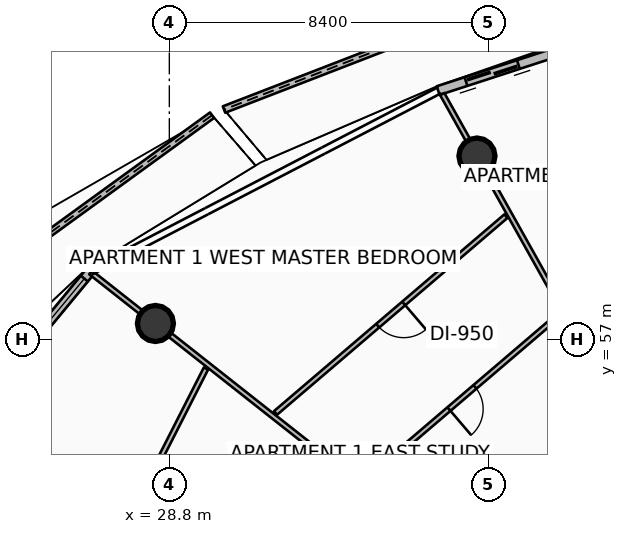
"""IFC4 building model, lengths in metres.
Left out: names, types, materials, properties, quantities, classifications, styles, units other than length and angle.
Written with IfcOpenShell. Run it as: python <this file> out.ifc"""

import sys

from ifc_helpers import new_model, si_unit, direction, frame, frame_2d, origin, origin_2d, place, context, subcontext, project, spatial, polyline, rectangle, circle, outline, extrude, element, fill, save


model = new_model("IFC4")
c1 = context("Model", 3, precision=1e-05, world=origin(), true_north=direction((0.0, 1.0)))
c2 = subcontext(c1, "Body", "Model", "MODEL_VIEW")
j1 = project(units=[si_unit("LENGTHUNIT", "METRE"), si_unit("PLANEANGLEUNIT", "RADIAN")], contexts=[c1])
p1 = place(None, origin())
s1 = spatial("IfcSite", under=j1, at=p1, CompositionType="ELEMENT")
p2 = place(p1, origin())
s2 = spatial("IfcBuilding", under=s1, at=p2, CompositionType="ELEMENT")
p3 = place(p2, frame((0.0, 0.0, 259.8)))
s3 = spatial("IfcBuildingStorey", under=s2, at=p3, CompositionType="ELEMENT", Elevation=259.8)
for number, where, z_axis, x_axis in (
    (1, (36.895, 61.83, 0.0), (0.0, 0.0, 1.0), (1.0, 0.0, 0.0)),
    (2, (28.434, 57.425, 0.0), (0.0, 0.0, 1.0), (1.0, 0.0, 0.0)),
):
    element("IfcColumn", number, at=place(p3, frame(where, z_axis=z_axis, x_axis=x_axis)), inside=s3, PredefinedType="COLUMN", context=c2, shape_type="SweptSolid", body=[
        extrude(circle(Radius=0.475, at=origin_2d()), origin(), (0.0, 0.0, 1.0), 3.59),
    ])
p4 = place(p3, frame((39.828, 66.762, 0.0), z_axis=(0.0, 0.0, 1.0), x_axis=(-0.9326848715, -0.36069229334, 0.0)))
e3 = element("IfcWall", 3, at=p4, inside=s3, PredefinedType="PARAPET", context=c2, shape_type="SweptSolid", body=[
    extrude(outline(polyline([(0.0, 0.0), (10.281, 0.0), (10.281, 1.224), (5.14, 1.127), (0.0, 1.148), (0.0, 0.0)])), frame((0.0, 0.09, 0.0), z_axis=(0.0, -1.0, 0.0), x_axis=(1.0, 0.0, 0.0)), (0.0, 0.0, 1.0), 0.18),
])
p5 = place(p3, frame((29.924, 62.905, 0.0), z_axis=(0.0, 0.0, 1.0), x_axis=(-0.809261043527, -0.587449200722, 0.0)))
e4 = element("IfcWall", 4, at=p5, inside=s3, PredefinedType="PARAPET", context=c2, shape_type="SweptSolid", body=[
    extrude(outline(polyline([(0.0, 0.0), (11.577, 0.0), (11.577, 1.632), (5.788, 1.418), (0.0, 1.233), (0.0, 0.0)])), frame((0.0, 0.09, 0.0), z_axis=(0.0, -1.0, 0.0), x_axis=(1.0, 0.0, 0.0)), (0.0, 0.0, 1.0), 0.18),
])
p6 = place(p3, frame((45.142, 66.564, 0.0), z_axis=(0.0, 0.0, 1.0), x_axis=(-0.951055974609, -0.309018661507, 0.0)))
e5 = element("IfcWall", 5, at=p6, inside=s3, PredefinedType="SOLIDWALL", context=c2, shape_type="SweptSolid", body=[
    extrude(rectangle(XDim=9.745, YDim=0.24, at=frame_2d((4.873, 0.0))), origin(), (0.0, 0.0, 1.0), 2.54),
])
p7 = place(p6, frame((7.525, 0.0, 0.0)))
e6 = element("IfcOpeningElement", 6, at=p7, cuts=e5, PredefinedType="OPENING", context=c2, shape_type="SweptSolid", body=[
    extrude(rectangle(XDim=1.45, YDim=2.15, at=frame_2d((0.725, 1.075))), frame((0.0, 0.13, 0.0), z_axis=(0.0, -1.0, 0.0), x_axis=(1.0, 0.0, 0.0)), (0.0, 0.0, 1.0), 0.26),
])
p8 = place(p6, frame((0.28, 0.0, 0.65)))
e7 = element("IfcOpeningElement", 7, at=p8, cuts=e5, PredefinedType="OPENING", context=c2, shape_type="SweptSolid", body=[
    extrude(rectangle(XDim=1.6, YDim=1.5, at=frame_2d((0.8, 0.75))), frame((0.0, 0.13, 0.0), z_axis=(0.0, -1.0, 0.0), x_axis=(1.0, 0.0, 0.0)), (0.0, 0.0, 1.0), 0.26),
])
p9 = place(p3, frame((26.742, 58.822, 0.0), z_axis=(0.0, 0.0, 1.0), x_axis=(-0.636680093065, -0.771128043255, 0.0)))
e8 = element("IfcWall", 8, at=p9, inside=s3, PredefinedType="SOLIDWALL", context=c2, shape_type="SweptSolid", body=[
    extrude(rectangle(XDim=11.438, YDim=0.24, at=frame_2d((5.719, 0.0))), origin(), (0.0, 0.0, 1.0), 2.54),
])
p10 = place(p9, frame((9.218, 0.0, 0.0)))
e9 = element("IfcOpeningElement", 9, at=p10, cuts=e8, PredefinedType="OPENING", context=c2, shape_type="SweptSolid", body=[
    extrude(rectangle(XDim=1.45, YDim=2.15, at=frame_2d((0.725, 1.075))), frame((0.0, 0.13, 0.0), z_axis=(0.0, -1.0, 0.0), x_axis=(1.0, 0.0, 0.0)), (0.0, 0.0, 1.0), 0.26),
])
p11 = place(p9, frame((0.28, 0.0, 0.65)))
e10 = element("IfcOpeningElement", 10, at=p11, cuts=e8, PredefinedType="OPENING", context=c2, shape_type="SweptSolid", body=[
    extrude(rectangle(XDim=1.6, YDim=1.5, at=frame_2d((0.8, 0.75))), frame((0.0, 0.13, 0.0), z_axis=(0.0, -1.0, 0.0), x_axis=(1.0, 0.0, 0.0)), (0.0, 0.0, 1.0), 0.26),
])
p12 = place(p3, frame((39.129, 57.839, 0.0), z_axis=(0.0, 0.0, 1.0), x_axis=(-0.488617220279, 0.872498259051, 0.0)))
e11 = element("IfcWall", 11, at=p12, inside=s3, PredefinedType="PARTITIONING", context=c2, shape_type="SweptSolid", body=[
    extrude(rectangle(XDim=6.441, YDim=0.125, at=frame_2d((3.22, 0.0))), origin(), (0.0, 0.0, 1.0), 2.957),
])
p13 = place(p3, frame((39.095, 57.681, 0.0), z_axis=(0.0, 0.0, 1.0), x_axis=(-0.760396866349, -0.649458702033, 0.0)))
e12 = element("IfcWall", 12, at=p13, inside=s3, PredefinedType="PARTITIONING", context=c2, shape_type="SweptSolid", body=[
    extrude(rectangle(XDim=6.824, YDim=0.125, at=frame_2d((3.412, 0.0))), origin(), (0.0, 0.0, 1.0), 2.957),
])
p14 = place(p13, frame((2.962, 0.0, 0.0)))
e13 = element("IfcOpeningElement", 13, at=p14, cuts=e12, PredefinedType="OPENING", context=c2, shape_type="SweptSolid", body=[
    extrude(rectangle(XDim=0.9, YDim=2.08, at=frame_2d((0.45, 1.04))), frame((0.0, 0.073, 0.0), z_axis=(0.0, -1.0, 0.0), x_axis=(1.0, 0.0, 0.0)), (0.0, 0.0, 1.0), 0.145),
])
p15 = place(p3, frame((37.657, 60.248, 0.0), z_axis=(0.0, 0.0, 1.0), x_axis=(-0.76041400447, -0.649438635905, 0.0)))
e14 = element("IfcWall", 14, at=p15, inside=s3, PredefinedType="PARTITIONING", context=c2, shape_type="SweptSolid", body=[
    extrude(rectangle(XDim=7.973, YDim=0.125, at=frame_2d((3.986, 0.0))), origin(), (0.0, 0.0, 1.0), 2.957),
])
p16 = place(p15, frame((3.536, 0.0, 0.0)))
e15 = element("IfcOpeningElement", 15, at=p16, cuts=e14, PredefinedType="OPENING", context=c2, shape_type="SweptSolid", body=[
    extrude(rectangle(XDim=0.9, YDim=2.08, at=frame_2d((0.45, 1.04))), frame((0.0, 0.073, 0.0), z_axis=(0.0, -1.0, 0.0), x_axis=(1.0, 0.0, 0.0)), (0.0, 0.0, 1.0), 0.145),
])
p17 = place(p3, frame((33.743, 53.239, 0.0), z_axis=(0.0, 0.0, 1.0), x_axis=(-0.785324118062, 0.619084832305, 0.0)))
e16 = element("IfcWall", 16, at=p17, inside=s3, PredefinedType="PARTITIONING", context=c2, shape_type="SweptSolid", body=[
    extrude(rectangle(XDim=8.931, YDim=0.125, at=frame_2d((4.465, 0.0))), origin(), (0.0, 0.0, 1.0), 2.957),
])
p18 = place(p3, frame((29.764, 56.239, 0.0), z_axis=(0.0, 0.0, 1.0), x_axis=(-0.453980126594, -0.891011809494, 0.0)))
e17 = element("IfcWall", 17, at=p18, inside=s3, PredefinedType="PARTITIONING", context=c2, shape_type="SweptSolid", body=[
    extrude(rectangle(XDim=8.816, YDim=0.125, at=frame_2d((4.408, 0.0))), origin(), (0.0, 0.0, 1.0), 2.957),
])
p19 = place(p18, frame((3.958, 0.0, 0.0)))
e18 = element("IfcOpeningElement", 18, at=p19, cuts=e17, PredefinedType="OPENING", context=c2, shape_type="SweptSolid", body=[
    extrude(rectangle(XDim=0.9, YDim=2.08, at=frame_2d((0.45, 1.04))), frame((0.0, 0.073, 0.0), z_axis=(0.0, -1.0, 0.0), x_axis=(1.0, 0.0, 0.0)), (0.0, 0.0, 1.0), 0.145),
])
p20 = place(p7, origin())
e19 = element("IfcDoor", 19, at=p20, inside=s3, OperationType="DOUBLE_DOOR_SLIDING", PredefinedType="DOOR", context=c2, shape_type="SweptSolid", body=[
    extrude(rectangle(XDim=1.45, YDim=2.15, at=frame_2d((0.725, 1.075))), frame((0.0, 0.025, 0.0), z_axis=(0.0, -1.0, 0.0), x_axis=(1.0, 0.0, 0.0)), (0.0, 0.0, 1.0), 0.05),
])
fill(e6, e19)
p21 = place(p11, origin())
e20 = element("IfcWindow", 20, at=p21, inside=s3, PartitioningType="SINGLE_PANEL", PredefinedType="WINDOW", context=c2, shape_type="SweptSolid", body=[
    extrude(rectangle(XDim=1.6, YDim=1.5, at=frame_2d((0.8, 0.75))), frame((0.0, 0.03, 0.0), z_axis=(0.0, -1.0, 0.0), x_axis=(1.0, 0.0, 0.0)), (0.0, 0.0, 1.0), 0.06),
])
fill(e10, e20)
p22 = place(p14, origin())
e21 = element("IfcDoor", 21, at=p22, inside=s3, OperationType="SINGLE_SWING_RIGHT", PredefinedType="DOOR", context=c2, shape_type="SweptSolid", body=[
    extrude(rectangle(XDim=0.9, YDim=2.08, at=frame_2d((0.45, 1.04))), frame((0.0, 0.025, 0.0), z_axis=(0.0, -1.0, 0.0), x_axis=(1.0, 0.0, 0.0)), (0.0, 0.0, 1.0), 0.05),
])
fill(e13, e21)
p23 = place(p16, origin())
e22 = element("IfcDoor", 22, at=p23, inside=s3, OperationType="SINGLE_SWING_LEFT", PredefinedType="DOOR", context=c2, shape_type="SweptSolid", body=[
    extrude(rectangle(XDim=0.9, YDim=2.08, at=frame_2d((0.45, 1.04))), frame((0.0, 0.025, 0.0), z_axis=(0.0, -1.0, 0.0), x_axis=(1.0, 0.0, 0.0)), (0.0, 0.0, 1.0), 0.05),
])
fill(e15, e22)
save(model, sys.argv[1])
